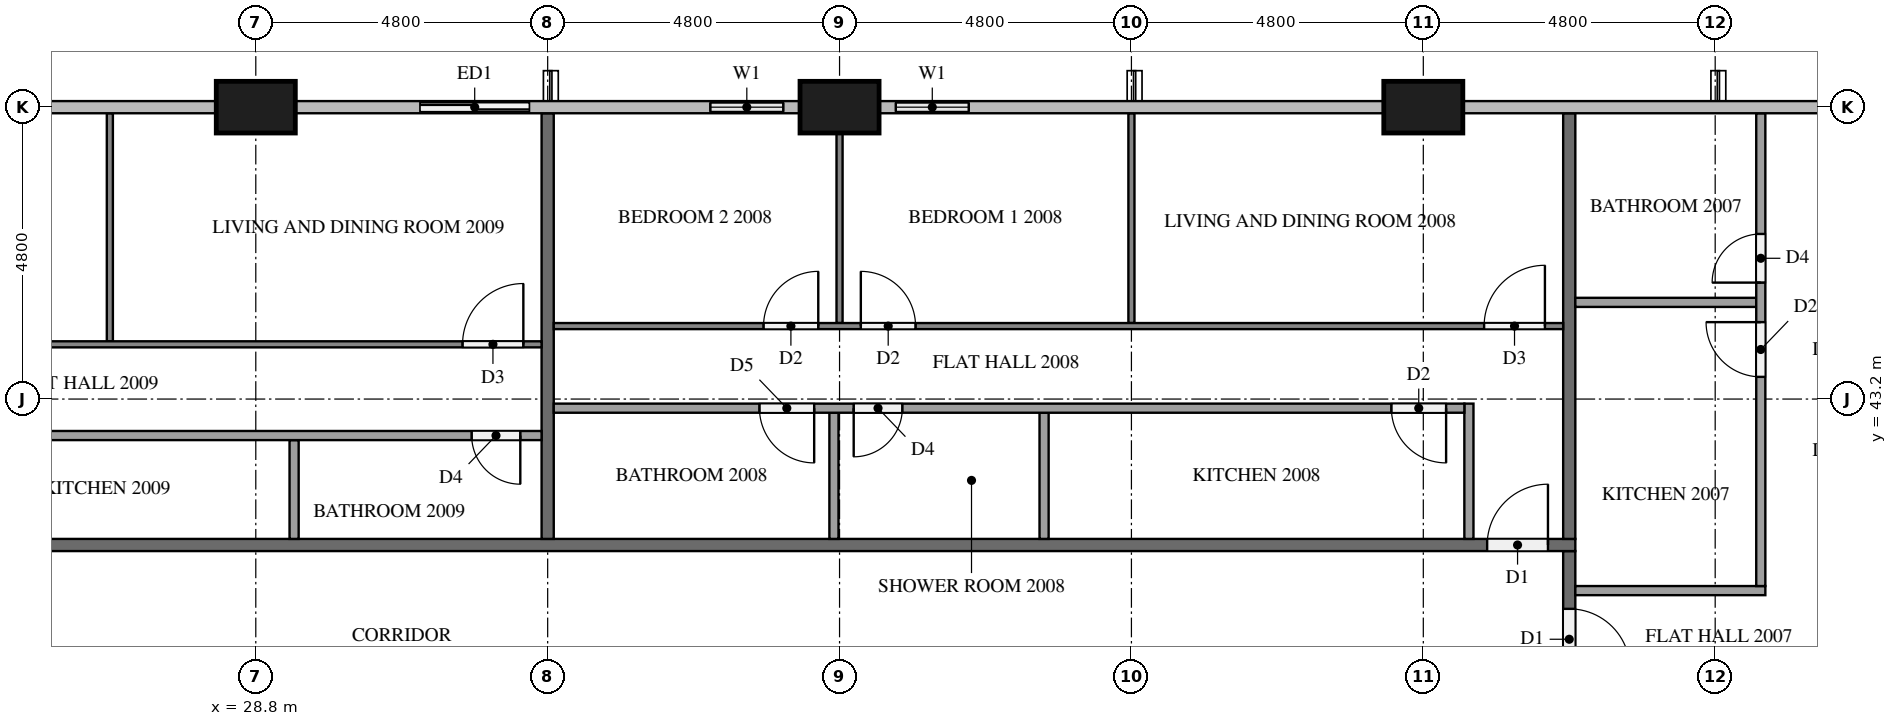
"""IFC4 building model, lengths in metres.
Left out: names, types, materials, properties, quantities, classifications, styles, units other than length and angle.
Written with IfcOpenShell. Run it as: python <this file> out.ifc"""

import sys

from ifc_helpers import new_model, si_unit, direction, frame, frame_2d, origin, origin_2d, place, context, subcontext, project, spatial, rectangle, extrude, element, fill, save


model = new_model("IFC4")
c1 = context("Model", 3, precision=1e-05, world=origin(), true_north=direction((0.0, 1.0)))
c2 = subcontext(c1, "Body", "Model", "MODEL_VIEW")
j1 = project(units=[si_unit("LENGTHUNIT", "METRE"), si_unit("PLANEANGLEUNIT", "RADIAN")], contexts=[c1])
p1 = place(None, origin())
s1 = spatial("IfcSite", under=j1, at=p1, CompositionType="ELEMENT")
p2 = place(p1, origin())
s2 = spatial("IfcBuilding", under=s1, at=p2, CompositionType="ELEMENT")
p3 = place(p2, frame((0.0, 0.0, 80.3)))
s3 = spatial("IfcBuildingStorey", under=s2, at=p3, CompositionType="ELEMENT", Elevation=80.3)
for number, where, z_axis, x_axis in (
    (1, (48.0, 48.0, 0.0), (0.0, 0.0, 1.0), (1.0, 0.0, 0.0)),
    (2, (38.4, 48.0, 0.0), (0.0, 0.0, 1.0), (1.0, 0.0, 0.0)),
    (3, (28.8, 48.0, 0.0), (0.0, 0.0, 1.0), (1.0, 0.0, 0.0)),
):
    element("IfcColumn", number, at=place(p3, frame(where, z_axis=z_axis, x_axis=x_axis)), inside=s3, PredefinedType="COLUMN", context=c2, shape_type="SweptSolid", body=[
        extrude(rectangle(XDim=1.3, YDim=0.85, at=origin_2d()), origin(), (0.0, 0.0, 1.0), 3.1),
    ])
p4 = place(p3, frame((40.8, 48.0, 0.0), z_axis=(0.0, 0.0, 1.0), x_axis=(-1.0, 0.0, 0.0)))
e4 = element("IfcWall", 4, at=p4, inside=s3, PredefinedType="SOLIDWALL", context=c2, shape_type="SweptSolid", body=[
    extrude(rectangle(XDim=1.75, YDim=0.15, at=frame_2d((0.875, 0.0))), origin(), (0.0, 0.0, 1.0), 3.1),
])
p5 = place(p4, frame((0.275, 0.0, 0.9)))
e5 = element("IfcOpeningElement", 5, at=p5, cuts=e4, PredefinedType="OPENING", context=c2, shape_type="SweptSolid", body=[
    extrude(rectangle(XDim=1.2, YDim=1.4, at=frame_2d((0.6, 0.7))), frame((0.0, 0.085, 0.0), z_axis=(0.0, -1.0, 0.0), x_axis=(1.0, 0.0, 0.0)), (0.0, 0.0, 1.0), 0.17),
])
p6 = place(p3, frame((37.75, 48.0, 0.0), z_axis=(0.0, 0.0, 1.0), x_axis=(-1.0, 0.0, 0.0)))
e6 = element("IfcWall", 6, at=p6, inside=s3, PredefinedType="SOLIDWALL", context=c2, shape_type="SweptSolid", body=[
    extrude(rectangle(XDim=1.75, YDim=0.15, at=frame_2d((0.875, 0.0))), origin(), (0.0, 0.0, 1.0), 3.1),
])
p7 = place(p6, frame((0.275, 0.0, 0.9)))
e7 = element("IfcOpeningElement", 7, at=p7, cuts=e6, PredefinedType="OPENING", context=c2, shape_type="SweptSolid", body=[
    extrude(rectangle(XDim=1.2, YDim=1.4, at=frame_2d((0.6, 0.7))), frame((0.0, 0.085, 0.0), z_axis=(0.0, -1.0, 0.0), x_axis=(1.0, 0.0, 0.0)), (0.0, 0.0, 1.0), 0.17),
])
p8 = place(p3, frame((33.6, 48.0, 0.0), z_axis=(0.0, 0.0, 1.0), x_axis=(-1.0, 0.0, 0.0)))
e8 = element("IfcWall", 8, at=p8, inside=s3, PredefinedType="SOLIDWALL", context=c2, shape_type="SweptSolid", body=[
    extrude(rectangle(XDim=2.4, YDim=0.15, at=frame_2d((1.2, 0.0))), origin(), (0.0, 0.0, 1.0), 3.1),
])
p9 = place(p8, frame((0.3, 0.0, 0.0)))
e9 = element("IfcOpeningElement", 9, at=p9, cuts=e8, PredefinedType="OPENING", context=c2, shape_type="SweptSolid", body=[
    extrude(rectangle(XDim=1.8, YDim=2.4, at=frame_2d((0.9, 1.2))), frame((0.0, 0.085, 0.0), z_axis=(0.0, -1.0, 0.0), x_axis=(1.0, 0.0, 0.0)), (0.0, 0.0, 1.0), 0.17),
])
p10 = place(p3, frame((50.4, 40.7, 0.0), z_axis=(0.0, 0.0, 1.0), x_axis=(0.0, -1.0, 0.0)))
e10 = element("IfcWall", 10, at=p10, inside=s3, PredefinedType="PARTITIONING", context=c2, shape_type="SweptSolid", body=[
    extrude(rectangle(XDim=28.6, YDim=0.2, at=frame_2d((14.3, 0.0))), origin(), (0.0, 0.0, 1.0), 3.1),
])
p11 = place(p10, frame((26.65, 0.0, 0.0)))
e11 = element("IfcOpeningElement", 11, at=p11, cuts=e10, PredefinedType="OPENING", context=c2, shape_type="SweptSolid", body=[
    extrude(rectangle(XDim=1.0, YDim=2.1, at=frame_2d((0.5, 1.05))), frame((0.0, 0.11, 0.0), z_axis=(0.0, -1.0, 0.0), x_axis=(1.0, 0.0, 0.0)), (0.0, 0.0, 1.0), 0.22),
])
p12 = place(p10, frame((9.85, 0.0, 0.0)))
e12 = element("IfcOpeningElement", 12, at=p12, cuts=e10, PredefinedType="OPENING", context=c2, shape_type="SweptSolid", body=[
    extrude(rectangle(XDim=1.0, YDim=2.1, at=frame_2d((0.5, 1.05))), frame((0.0, 0.11, 0.0), z_axis=(0.0, -1.0, 0.0), x_axis=(1.0, 0.0, 0.0)), (0.0, 0.0, 1.0), 0.22),
])
p13 = place(p10, frame((2.65, 0.0, 0.0)))
e13 = element("IfcOpeningElement", 13, at=p13, cuts=e10, PredefinedType="OPENING", context=c2, shape_type="SweptSolid", body=[
    extrude(rectangle(XDim=1.0, YDim=2.1, at=frame_2d((0.5, 1.05))), frame((0.0, 0.11, 0.0), z_axis=(0.0, -1.0, 0.0), x_axis=(1.0, 0.0, 0.0)), (0.0, 0.0, 1.0), 0.22),
])
p14 = place(p10, frame((0.95, 0.0, 0.0)))
e14 = element("IfcOpeningElement", 14, at=p14, cuts=e10, PredefinedType="OPENING", context=c2, shape_type="SweptSolid", body=[
    extrude(rectangle(XDim=1.0, YDim=2.1, at=frame_2d((0.5, 1.05))), frame((0.0, 0.11, 0.0), z_axis=(0.0, -1.0, 0.0), x_axis=(1.0, 0.0, 0.0)), (0.0, 0.0, 1.0), 0.22),
])
p15 = place(p3, frame((11.9, 40.8, 0.0), z_axis=(0.0, 0.0, 1.0), x_axis=(1.0, 0.0, 0.0)))
e15 = element("IfcWall", 15, at=p15, inside=s3, PredefinedType="PARTITIONING", context=c2, shape_type="SweptSolid", body=[
    extrude(rectangle(XDim=38.6, YDim=0.2, at=frame_2d((19.3, 0.0))), origin(), (0.0, 0.0, 1.0), 3.1),
])
p16 = place(p15, frame((37.15, 0.0, 0.0)))
e16 = element("IfcOpeningElement", 16, at=p16, cuts=e15, PredefinedType="OPENING", context=c2, shape_type="SweptSolid", body=[
    extrude(rectangle(XDim=1.0, YDim=2.1, at=frame_2d((0.5, 1.05))), frame((0.0, 0.11, 0.0), z_axis=(0.0, -1.0, 0.0), x_axis=(1.0, 0.0, 0.0)), (0.0, 0.0, 1.0), 0.22),
])
p17 = place(p15, frame((10.05, 0.0, 0.0)))
e17 = element("IfcOpeningElement", 17, at=p17, cuts=e15, PredefinedType="OPENING", context=c2, shape_type="SweptSolid", body=[
    extrude(rectangle(XDim=1.0, YDim=2.1, at=frame_2d((0.5, 1.05))), frame((0.0, 0.11, 0.0), z_axis=(0.0, -1.0, 0.0), x_axis=(1.0, 0.0, 0.0)), (0.0, 0.0, 1.0), 0.22),
])
p18 = place(p15, frame((8.35, 0.0, 0.0)))
e18 = element("IfcOpeningElement", 18, at=p18, cuts=e15, PredefinedType="OPENING", context=c2, shape_type="SweptSolid", body=[
    extrude(rectangle(XDim=1.0, YDim=2.1, at=frame_2d((0.5, 1.05))), frame((0.0, 0.11, 0.0), z_axis=(0.0, -1.0, 0.0), x_axis=(1.0, 0.0, 0.0)), (0.0, 0.0, 1.0), 0.22),
])
for number, where, z_axis, x_axis in (
    (19, (50.4, 40.9, 0.0), (0.0, 0.0, 1.0), (0.0, 1.0, 0.0)),
    (20, (33.6, 47.9, 0.0), (0.0, 0.0, 1.0), (0.0, -1.0, 0.0)),
):
    element("IfcWall", number, at=place(p3, frame(where, z_axis=z_axis, x_axis=x_axis)), inside=s3, PredefinedType="PARTITIONING", context=c2, shape_type="SweptSolid", body=[
        extrude(rectangle(XDim=7.0, YDim=0.2, at=frame_2d((3.5, 0.0))), origin(), (0.0, 0.0, 1.0), 3.1),
    ])
p19 = place(p3, frame((50.5, 44.79, 0.0), z_axis=(0.0, 0.0, 1.0), x_axis=(1.0, 0.0, 0.0)))
e21 = element("IfcWall", 21, at=p19, inside=s3, PredefinedType="PARTITIONING", context=c2, shape_type="SweptSolid", body=[
    extrude(rectangle(XDim=2.975, YDim=0.15, at=frame_2d((1.488, 0.0))), origin(), (0.0, 0.0, 1.0), 3.1),
])
p20 = place(p3, frame((50.5, 40.05, 0.0), z_axis=(0.0, 0.0, 1.0), x_axis=(1.0, 0.0, 0.0)))
e22 = element("IfcWall", 22, at=p20, inside=s3, PredefinedType="PARTITIONING", context=c2, shape_type="SweptSolid", body=[
    extrude(rectangle(XDim=3.125, YDim=0.15, at=frame_2d((1.562, 0.0))), origin(), (0.0, 0.0, 1.0), 3.1),
])
p21 = place(p3, frame((53.55, 40.125, 0.0), z_axis=(0.0, 0.0, 1.0), x_axis=(0.0, 1.0, 0.0)))
e23 = element("IfcWall", 23, at=p21, inside=s3, PredefinedType="PARTITIONING", context=c2, shape_type="SweptSolid", body=[
    extrude(rectangle(XDim=7.775, YDim=0.15, at=frame_2d((3.887, 0.0))), origin(), (0.0, 0.0, 1.0), 3.1),
])
p22 = place(p21, frame((3.44, 0.0, 0.0)))
e24 = element("IfcOpeningElement", 24, at=p22, cuts=e23, PredefinedType="OPENING", context=c2, shape_type="SweptSolid", body=[
    extrude(rectangle(XDim=0.9, YDim=2.1, at=frame_2d((0.45, 1.05))), frame((0.0, 0.085, 0.0), z_axis=(0.0, -1.0, 0.0), x_axis=(1.0, 0.0, 0.0)), (0.0, 0.0, 1.0), 0.17),
])
p23 = place(p21, frame((4.99, 0.0, 0.0)))
e25 = element("IfcOpeningElement", 25, at=p23, cuts=e23, PredefinedType="OPENING", context=c2, shape_type="SweptSolid", body=[
    extrude(rectangle(XDim=0.8, YDim=2.1, at=frame_2d((0.4, 1.05))), frame((0.0, 0.085, 0.0), z_axis=(0.0, -1.0, 0.0), x_axis=(1.0, 0.0, 0.0)), (0.0, 0.0, 1.0), 0.17),
])
p24 = place(p3, frame((43.2, 44.45, 0.0), z_axis=(0.0, 0.0, 1.0), x_axis=(0.0, 1.0, 0.0)))
e26 = element("IfcWall", 26, at=p24, inside=s3, PredefinedType="PARTITIONING", context=c2, shape_type="SweptSolid", body=[
    extrude(rectangle(XDim=3.45, YDim=0.1, at=frame_2d((1.725, 0.0))), origin(), (0.0, 0.0, 1.0), 3.1),
])
p25 = place(p3, frame((38.4, 44.45, 0.0), z_axis=(0.0, 0.0, 1.0), x_axis=(0.0, 1.0, 0.0)))
e27 = element("IfcWall", 27, at=p25, inside=s3, PredefinedType="PARTITIONING", context=c2, shape_type="SweptSolid", body=[
    extrude(rectangle(XDim=3.125, YDim=0.1, at=frame_2d((1.562, 0.0))), origin(), (0.0, 0.0, 1.0), 3.1),
])
p26 = place(p3, frame((33.7, 44.4, 0.0), z_axis=(0.0, 0.0, 1.0), x_axis=(1.0, 0.0, 0.0)))
e28 = element("IfcWall", 28, at=p26, inside=s3, PredefinedType="PARTITIONING", context=c2, shape_type="SweptSolid", body=[
    extrude(rectangle(XDim=16.6, YDim=0.1, at=frame_2d((8.3, 0.0))), origin(), (0.0, 0.0, 1.0), 3.1),
])
p27 = place(p26, frame((15.3, 0.0, 0.0)))
e29 = element("IfcOpeningElement", 29, at=p27, cuts=e28, PredefinedType="OPENING", context=c2, shape_type="SweptSolid", body=[
    extrude(rectangle(XDim=1.0, YDim=2.1, at=frame_2d((0.5, 1.05))), frame((0.0, 0.06, 0.0), z_axis=(0.0, -1.0, 0.0), x_axis=(1.0, 0.0, 0.0)), (0.0, 0.0, 1.0), 0.12),
])
p28 = place(p26, frame((5.05, 0.0, 0.0)))
e30 = element("IfcOpeningElement", 30, at=p28, cuts=e28, PredefinedType="OPENING", context=c2, shape_type="SweptSolid", body=[
    extrude(rectangle(XDim=0.9, YDim=2.1, at=frame_2d((0.45, 1.05))), frame((0.0, 0.06, 0.0), z_axis=(0.0, -1.0, 0.0), x_axis=(1.0, 0.0, 0.0)), (0.0, 0.0, 1.0), 0.12),
])
p29 = place(p26, frame((3.45, 0.0, 0.0)))
e31 = element("IfcOpeningElement", 31, at=p29, cuts=e28, PredefinedType="OPENING", context=c2, shape_type="SweptSolid", body=[
    extrude(rectangle(XDim=0.9, YDim=2.1, at=frame_2d((0.45, 1.05))), frame((0.0, 0.06, 0.0), z_axis=(0.0, -1.0, 0.0), x_axis=(1.0, 0.0, 0.0)), (0.0, 0.0, 1.0), 0.12),
])
for number, where, z_axis, x_axis in (
    (32, (41.763, 40.9, 0.0), (0.0, 0.0, 1.0), (0.0, 1.0, 0.0)),
    (33, (38.308, 40.9, 0.0), (0.0, 0.0, 1.0), (0.0, 1.0, 0.0)),
):
    element("IfcWall", number, at=place(p3, frame(where, z_axis=z_axis, x_axis=x_axis)), inside=s3, PredefinedType="PARTITIONING", context=c2, shape_type="SweptSolid", body=[
        extrude(rectangle(XDim=2.075, YDim=0.15, at=frame_2d((1.038, 0.0))), origin(), (0.0, 0.0, 1.0), 3.1),
    ])
p30 = place(p3, frame((48.75, 40.9, 0.0), z_axis=(0.0, 0.0, 1.0), x_axis=(0.0, 1.0, 0.0)))
e34 = element("IfcWall", 34, at=p30, inside=s3, PredefinedType="PARTITIONING", context=c2, shape_type="SweptSolid", body=[
    extrude(rectangle(XDim=2.225, YDim=0.15, at=frame_2d((1.113, 0.0))), origin(), (0.0, 0.0, 1.0), 3.1),
])
p31 = place(p3, frame((48.675, 43.05, 0.0), z_axis=(0.0, 0.0, 1.0), x_axis=(-1.0, 0.0, 0.0)))
e35 = element("IfcWall", 35, at=p31, inside=s3, PredefinedType="PARTITIONING", context=c2, shape_type="SweptSolid", body=[
    extrude(rectangle(XDim=14.975, YDim=0.15, at=frame_2d((7.488, 0.0))), origin(), (0.0, 0.0, 1.0), 3.1),
])
p32 = place(p31, frame((0.3, 0.0, 0.0)))
e36 = element("IfcOpeningElement", 36, at=p32, cuts=e35, PredefinedType="OPENING", context=c2, shape_type="SweptSolid", body=[
    extrude(rectangle(XDim=0.9, YDim=2.1, at=frame_2d((0.45, 1.05))), frame((0.0, 0.085, 0.0), z_axis=(0.0, -1.0, 0.0), x_axis=(1.0, 0.0, 0.0)), (0.0, 0.0, 1.0), 0.17),
])
p33 = place(p31, frame((9.242, 0.0, 0.0)))
e37 = element("IfcOpeningElement", 37, at=p33, cuts=e35, PredefinedType="OPENING", context=c2, shape_type="SweptSolid", body=[
    extrude(rectangle(XDim=0.8, YDim=2.1, at=frame_2d((0.4, 1.05))), frame((0.0, 0.085, 0.0), z_axis=(0.0, -1.0, 0.0), x_axis=(1.0, 0.0, 0.0)), (0.0, 0.0, 1.0), 0.17),
])
p34 = place(p31, frame((10.692, 0.0, 0.0)))
e38 = element("IfcOpeningElement", 38, at=p34, cuts=e35, PredefinedType="OPENING", context=c2, shape_type="SweptSolid", body=[
    extrude(rectangle(XDim=0.9, YDim=2.1, at=frame_2d((0.45, 1.05))), frame((0.0, 0.085, 0.0), z_axis=(0.0, -1.0, 0.0), x_axis=(1.0, 0.0, 0.0)), (0.0, 0.0, 1.0), 0.17),
])
p35 = place(p3, frame((26.4, 44.15, 0.0), z_axis=(0.0, 0.0, 1.0), x_axis=(0.0, 1.0, 0.0)))
e39 = element("IfcWall", 39, at=p35, inside=s3, PredefinedType="PARTITIONING", context=c2, shape_type="SweptSolid", body=[
    extrude(rectangle(XDim=3.75, YDim=0.1, at=frame_2d((1.875, 0.0))), origin(), (0.0, 0.0, 1.0), 3.1),
])
p36 = place(p3, frame((21.7, 44.1, 0.0), z_axis=(0.0, 0.0, 1.0), x_axis=(1.0, 0.0, 0.0)))
e40 = element("IfcWall", 40, at=p36, inside=s3, PredefinedType="PARTITIONING", context=c2, shape_type="SweptSolid", body=[
    extrude(rectangle(XDim=11.8, YDim=0.1, at=frame_2d((5.9, 0.0))), origin(), (0.0, 0.0, 1.0), 3.1),
])
p37 = place(p36, frame((0.3, 0.0, 0.0)))
e41 = element("IfcOpeningElement", 41, at=p37, cuts=e40, PredefinedType="OPENING", context=c2, shape_type="SweptSolid", body=[
    extrude(rectangle(XDim=0.9, YDim=2.1, at=frame_2d((0.45, 1.05))), frame((0.0, 0.06, 0.0), z_axis=(0.0, -1.0, 0.0), x_axis=(1.0, 0.0, 0.0)), (0.0, 0.0, 1.0), 0.12),
])
p38 = place(p36, frame((10.5, 0.0, 0.0)))
e42 = element("IfcOpeningElement", 42, at=p38, cuts=e40, PredefinedType="OPENING", context=c2, shape_type="SweptSolid", body=[
    extrude(rectangle(XDim=1.0, YDim=2.1, at=frame_2d((0.5, 1.05))), frame((0.0, 0.06, 0.0), z_axis=(0.0, -1.0, 0.0), x_axis=(1.0, 0.0, 0.0)), (0.0, 0.0, 1.0), 0.12),
])
p39 = place(p3, frame((29.43, 40.9, 0.0), z_axis=(0.0, 0.0, 1.0), x_axis=(0.0, 1.0, 0.0)))
e43 = element("IfcWall", 43, at=p39, inside=s3, PredefinedType="PARTITIONING", context=c2, shape_type="SweptSolid", body=[
    extrude(rectangle(XDim=1.625, YDim=0.15, at=frame_2d((0.812, 0.0))), origin(), (0.0, 0.0, 1.0), 3.1),
])
p40 = place(p3, frame((33.5, 42.6, 0.0), z_axis=(0.0, 0.0, 1.0), x_axis=(-1.0, 0.0, 0.0)))
e44 = element("IfcWall", 44, at=p40, inside=s3, PredefinedType="PARTITIONING", context=c2, shape_type="SweptSolid", body=[
    extrude(rectangle(XDim=10.175, YDim=0.15, at=frame_2d((5.087, 0.0))), origin(), (0.0, 0.0, 1.0), 3.1),
])
p41 = place(p40, frame((8.975, 0.0, 0.0)))
e45 = element("IfcOpeningElement", 45, at=p41, cuts=e44, PredefinedType="OPENING", context=c2, shape_type="SweptSolid", body=[
    extrude(rectangle(XDim=0.9, YDim=2.1, at=frame_2d((0.45, 1.05))), frame((0.0, 0.085, 0.0), z_axis=(0.0, -1.0, 0.0), x_axis=(1.0, 0.0, 0.0)), (0.0, 0.0, 1.0), 0.17),
])
p42 = place(p40, frame((0.35, 0.0, 0.0)))
e46 = element("IfcOpeningElement", 46, at=p42, cuts=e44, PredefinedType="OPENING", context=c2, shape_type="SweptSolid", body=[
    extrude(rectangle(XDim=0.8, YDim=2.1, at=frame_2d((0.4, 1.05))), frame((0.0, 0.085, 0.0), z_axis=(0.0, -1.0, 0.0), x_axis=(1.0, 0.0, 0.0)), (0.0, 0.0, 1.0), 0.17),
])
p43 = place(p5, origin())
e47 = element("IfcWindow", 47, at=p43, inside=s3, PartitioningType="SINGLE_PANEL", PredefinedType="WINDOW", context=c2, shape_type="SweptSolid", body=[
    extrude(rectangle(XDim=1.2, YDim=1.4, at=frame_2d((0.6, 0.7))), frame((0.0, 0.03, 0.0), z_axis=(0.0, -1.0, 0.0), x_axis=(1.0, 0.0, 0.0)), (0.0, 0.0, 1.0), 0.06),
])
fill(e5, e47)
p44 = place(p7, origin())
e48 = element("IfcWindow", 48, at=p44, inside=s3, PartitioningType="SINGLE_PANEL", PredefinedType="WINDOW", context=c2, shape_type="SweptSolid", body=[
    extrude(rectangle(XDim=1.2, YDim=1.4, at=frame_2d((0.6, 0.7))), frame((0.0, 0.03, 0.0), z_axis=(0.0, -1.0, 0.0), x_axis=(1.0, 0.0, 0.0)), (0.0, 0.0, 1.0), 0.06),
])
fill(e7, e48)
p45 = place(p9, origin())
e49 = element("IfcDoor", 49, at=p45, inside=s3, OperationType="SLIDING_TO_RIGHT", PredefinedType="DOOR", context=c2, shape_type="SweptSolid", body=[
    extrude(rectangle(XDim=1.8, YDim=2.4, at=frame_2d((0.9, 1.2))), frame((0.0, 0.025, 0.0), z_axis=(0.0, -1.0, 0.0), x_axis=(1.0, 0.0, 0.0)), (0.0, 0.0, 1.0), 0.05),
])
fill(e9, e49)
p46 = place(p14, origin())
e50 = element("IfcDoor", 50, at=p46, inside=s3, OperationType="SINGLE_SWING_RIGHT", PredefinedType="DOOR", context=c2, shape_type="SweptSolid", body=[
    extrude(rectangle(XDim=1.0, YDim=2.1, at=frame_2d((0.5, 1.05))), frame((0.0, 0.025, 0.0), z_axis=(0.0, -1.0, 0.0), x_axis=(1.0, 0.0, 0.0)), (0.0, 0.0, 1.0), 0.05),
])
fill(e14, e50)
p47 = place(p16, origin())
e51 = element("IfcDoor", 51, at=p47, inside=s3, OperationType="SINGLE_SWING_RIGHT", PredefinedType="DOOR", context=c2, shape_type="SweptSolid", body=[
    extrude(rectangle(XDim=1.0, YDim=2.1, at=frame_2d((0.5, 1.05))), frame((0.0, 0.025, 0.0), z_axis=(0.0, -1.0, 0.0), x_axis=(1.0, 0.0, 0.0)), (0.0, 0.0, 1.0), 0.05),
])
fill(e16, e51)
p48 = place(p22, origin())
e52 = element("IfcDoor", 52, at=p48, inside=s3, OperationType="SINGLE_SWING_RIGHT", PredefinedType="DOOR", context=c2, shape_type="SweptSolid", body=[
    extrude(rectangle(XDim=0.9, YDim=2.1, at=frame_2d((0.45, 1.05))), frame((0.0, 0.025, 0.0), z_axis=(0.0, -1.0, 0.0), x_axis=(1.0, 0.0, 0.0)), (0.0, 0.0, 1.0), 0.05),
])
fill(e24, e52)
p49 = place(p23, origin())
e53 = element("IfcDoor", 53, at=p49, inside=s3, OperationType="SINGLE_SWING_LEFT", PredefinedType="DOOR", context=c2, shape_type="SweptSolid", body=[
    extrude(rectangle(XDim=0.8, YDim=2.1, at=frame_2d((0.4, 1.05))), frame((0.0, 0.025, 0.0), z_axis=(0.0, -1.0, 0.0), x_axis=(1.0, 0.0, 0.0)), (0.0, 0.0, 1.0), 0.05),
])
fill(e25, e53)
p50 = place(p27, origin())
e54 = element("IfcDoor", 54, at=p50, inside=s3, OperationType="SINGLE_SWING_RIGHT", PredefinedType="DOOR", context=c2, shape_type="SweptSolid", body=[
    extrude(rectangle(XDim=1.0, YDim=2.1, at=frame_2d((0.5, 1.05))), frame((0.0, 0.025, 0.0), z_axis=(0.0, -1.0, 0.0), x_axis=(1.0, 0.0, 0.0)), (0.0, 0.0, 1.0), 0.05),
])
fill(e29, e54)
p51 = place(p28, origin())
e55 = element("IfcDoor", 55, at=p51, inside=s3, OperationType="SINGLE_SWING_LEFT", PredefinedType="DOOR", context=c2, shape_type="SweptSolid", body=[
    extrude(rectangle(XDim=0.9, YDim=2.1, at=frame_2d((0.45, 1.05))), frame((0.0, 0.025, 0.0), z_axis=(0.0, -1.0, 0.0), x_axis=(1.0, 0.0, 0.0)), (0.0, 0.0, 1.0), 0.05),
])
fill(e30, e55)
p52 = place(p29, origin())
e56 = element("IfcDoor", 56, at=p52, inside=s3, OperationType="SINGLE_SWING_RIGHT", PredefinedType="DOOR", context=c2, shape_type="SweptSolid", body=[
    extrude(rectangle(XDim=0.9, YDim=2.1, at=frame_2d((0.45, 1.05))), frame((0.0, 0.025, 0.0), z_axis=(0.0, -1.0, 0.0), x_axis=(1.0, 0.0, 0.0)), (0.0, 0.0, 1.0), 0.05),
])
fill(e31, e56)
p53 = place(p32, origin())
e57 = element("IfcDoor", 57, at=p53, inside=s3, OperationType="SINGLE_SWING_LEFT", PredefinedType="DOOR", context=c2, shape_type="SweptSolid", body=[
    extrude(rectangle(XDim=0.9, YDim=2.1, at=frame_2d((0.45, 1.05))), frame((0.0, 0.025, 0.0), z_axis=(0.0, -1.0, 0.0), x_axis=(1.0, 0.0, 0.0)), (0.0, 0.0, 1.0), 0.05),
])
fill(e36, e57)
p54 = place(p33, origin())
e58 = element("IfcDoor", 58, at=p54, inside=s3, OperationType="SINGLE_SWING_RIGHT", PredefinedType="DOOR", context=c2, shape_type="SweptSolid", body=[
    extrude(rectangle(XDim=0.8, YDim=2.1, at=frame_2d((0.4, 1.05))), frame((0.0, 0.025, 0.0), z_axis=(0.0, -1.0, 0.0), x_axis=(1.0, 0.0, 0.0)), (0.0, 0.0, 1.0), 0.05),
])
fill(e37, e58)
p55 = place(p34, origin())
e59 = element("IfcDoor", 59, at=p55, inside=s3, OperationType="SINGLE_SWING_LEFT", PredefinedType="DOOR", context=c2, shape_type="SweptSolid", body=[
    extrude(rectangle(XDim=0.9, YDim=2.1, at=frame_2d((0.45, 1.05))), frame((0.0, 0.025, 0.0), z_axis=(0.0, -1.0, 0.0), x_axis=(1.0, 0.0, 0.0)), (0.0, 0.0, 1.0), 0.05),
])
fill(e38, e59)
p56 = place(p38, origin())
e60 = element("IfcDoor", 60, at=p56, inside=s3, OperationType="SINGLE_SWING_RIGHT", PredefinedType="DOOR", context=c2, shape_type="SweptSolid", body=[
    extrude(rectangle(XDim=1.0, YDim=2.1, at=frame_2d((0.5, 1.05))), frame((0.0, 0.025, 0.0), z_axis=(0.0, -1.0, 0.0), x_axis=(1.0, 0.0, 0.0)), (0.0, 0.0, 1.0), 0.05),
])
fill(e42, e60)
p57 = place(p42, origin())
e61 = element("IfcDoor", 61, at=p57, inside=s3, OperationType="SINGLE_SWING_LEFT", PredefinedType="DOOR", context=c2, shape_type="SweptSolid", body=[
    extrude(rectangle(XDim=0.8, YDim=2.1, at=frame_2d((0.4, 1.05))), frame((0.0, 0.025, 0.0), z_axis=(0.0, -1.0, 0.0), x_axis=(1.0, 0.0, 0.0)), (0.0, 0.0, 1.0), 0.05),
])
fill(e46, e61)
save(model, sys.argv[1])
